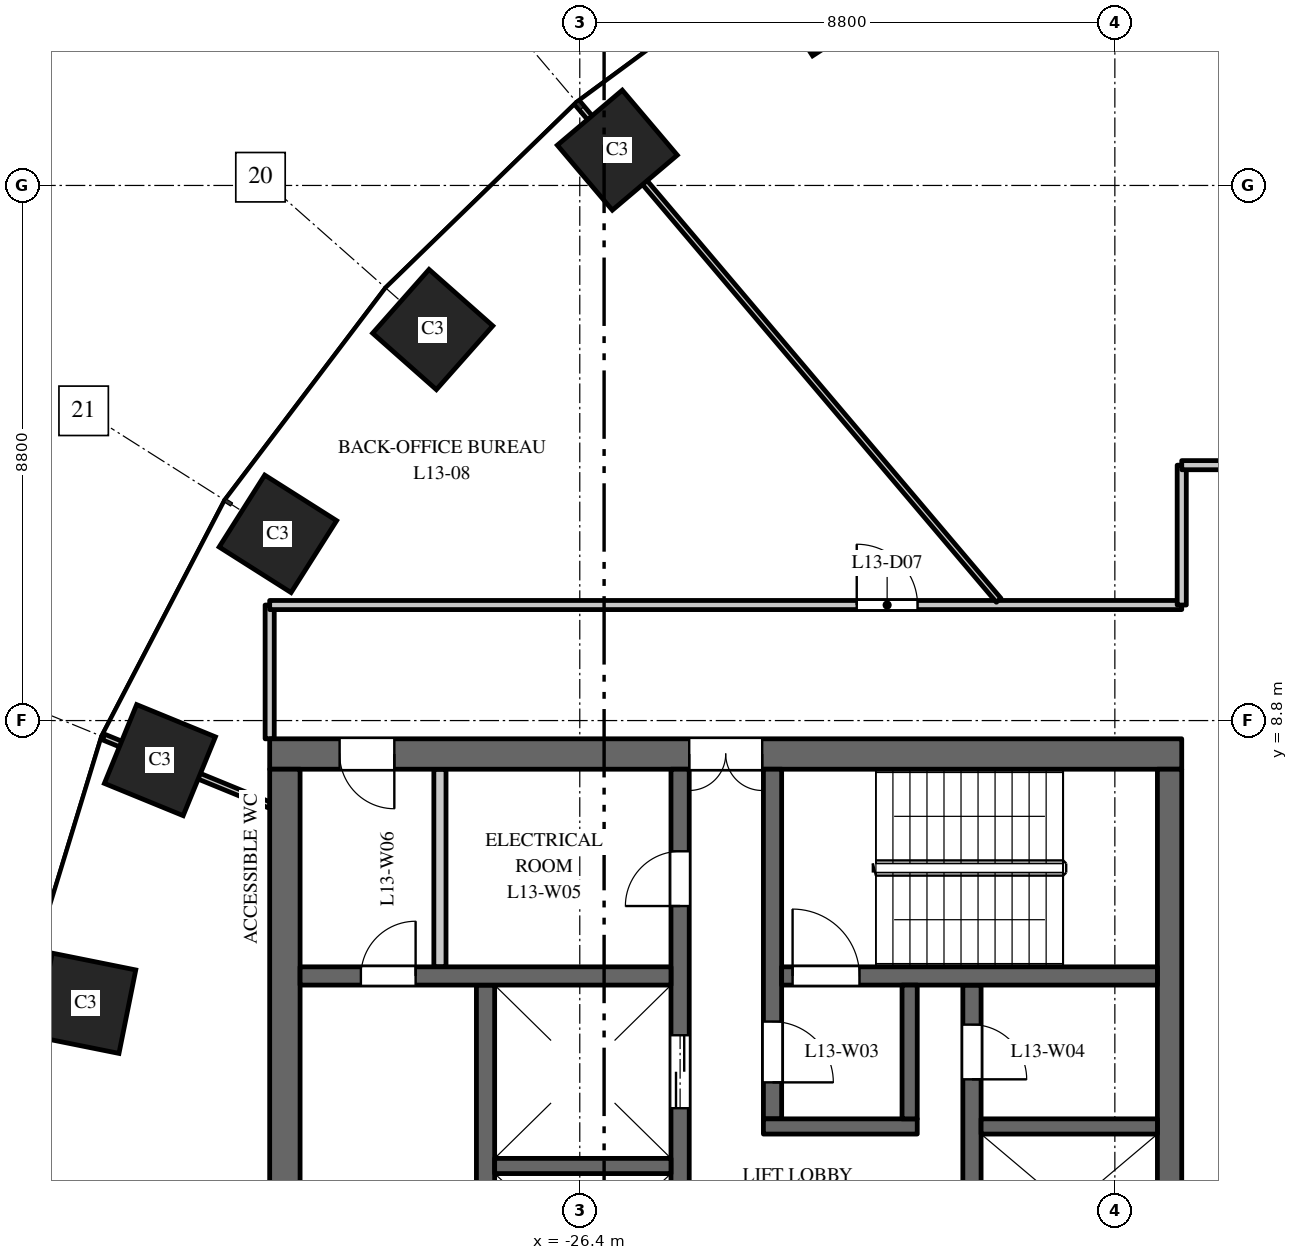
"""IFC4 building model, lengths in metres.
Left out: names, types, materials, properties, quantities, classifications, styles, units other than length and angle.
Written with IfcOpenShell. Run it as: python <this file> out.ifc"""

import sys

from ifc_helpers import new_model, si_unit, direction, frame, frame_2d, origin, origin_2d, place, context, subcontext, project, spatial, rectangle, extrude, element, fill, save


model = new_model("IFC4")
c1 = context("Model", 3, precision=1e-05, world=origin(), true_north=direction((0.0, 1.0)))
c2 = subcontext(c1, "Body", "Model", "MODEL_VIEW")
j1 = project(units=[si_unit("LENGTHUNIT", "METRE"), si_unit("PLANEANGLEUNIT", "RADIAN")], contexts=[c1])
p1 = place(None, origin())
s1 = spatial("IfcSite", under=j1, at=p1, CompositionType="ELEMENT")
p2 = place(p1, origin())
s2 = spatial("IfcBuilding", under=s1, at=p2, CompositionType="ELEMENT")
p3 = place(p2, frame((0.0, 0.0, 62.5)))
s3 = spatial("IfcBuildingStorey", under=s2, at=p3, CompositionType="ELEMENT", Elevation=62.5)
for number, where, z_axis, x_axis in (
    (1, (-22.362, 20.7, 0.0), (0.0, 0.0, 1.0), (-0.84, -0.542, 0.0)),
    (2, (-25.783, 18.18, 0.0), (0.0, 0.0, 1.0), (-0.763, -0.646, 0.0)),
    (3, (-28.819, 15.23, 0.0), (0.0, 0.0, 1.0), (-0.663, -0.749, 0.0)),
    (4, (-31.365, 11.871, 0.0), (0.0, 0.0, 1.0), (-0.535, -0.845, 0.0)),
    (5, (-33.305, 8.149, 0.0), (0.0, 0.0, 1.0), (-0.379, -0.925, 0.0)),
    (6, (-34.527, 4.151, 0.0), (0.0, 0.0, 1.0), (-0.197, -0.98, 0.0)),
):
    element("IfcColumn", number, at=place(p3, frame(where, z_axis=z_axis, x_axis=x_axis)), inside=s3, PredefinedType="COLUMN", context=c2, shape_type="SweptSolid", body=[
        extrude(rectangle(XDim=1.4, YDim=1.4, at=origin_2d()), origin(), (0.0, 0.0, 1.0), 4.0),
    ])
p4 = place(p3, frame((-16.5, 8.25, 0.0), z_axis=(0.0, 0.0, 1.0), x_axis=(-1.0, 0.0, 0.0)))
e7 = element("IfcWall", 7, at=p4, inside=s3, PredefinedType="SHEAR", context=c2, shape_type="SweptSolid", body=[
    extrude(rectangle(XDim=15.0, YDim=0.5, at=frame_2d((7.5, 0.0))), origin(), (0.0, 0.0, 1.0), 3.7),
])
p5 = place(p4, frame((6.9, 0.0, 0.0)))
e8 = element("IfcOpeningElement", 8, at=p5, cuts=e7, PredefinedType="OPENING", context=c2, shape_type="SweptSolid", body=[
    extrude(rectangle(XDim=1.2, YDim=2.1, at=frame_2d((0.6, 1.05))), frame((0.0, 0.26, 0.0), z_axis=(0.0, -1.0, 0.0), x_axis=(1.0, 0.0, 0.0)), (0.0, 0.0, 1.0), 0.52),
])
p6 = place(p4, frame((12.95, 0.0, 0.0)))
e9 = element("IfcOpeningElement", 9, at=p6, cuts=e7, PredefinedType="OPENING", context=c2, shape_type="SweptSolid", body=[
    extrude(rectangle(XDim=0.9, YDim=2.1, at=frame_2d((0.45, 1.05))), frame((0.0, 0.26, 0.0), z_axis=(0.0, -1.0, 0.0), x_axis=(1.0, 0.0, 0.0)), (0.0, 0.0, 1.0), 0.52),
])
p7 = place(p3, frame((-27.95, -4.45, 0.0), z_axis=(0.0, 0.0, 1.0), x_axis=(0.0, 1.0, 0.0)))
e10 = element("IfcWall", 10, at=p7, inside=s3, PredefinedType="SHEAR", context=c2, shape_type="SweptSolid", body=[
    extrude(rectangle(XDim=8.9, YDim=0.3, at=frame_2d((4.45, 0.0))), origin(), (0.0, 0.0, 1.0), 3.7),
])
p8 = place(p3, frame((-19.95, -4.45, 0.0), z_axis=(0.0, 0.0, 1.0), x_axis=(0.0, 1.0, 0.0)))
e11 = element("IfcWall", 11, at=p8, inside=s3, PredefinedType="SHEAR", context=c2, shape_type="SweptSolid", body=[
    extrude(rectangle(XDim=8.9, YDim=0.3, at=frame_2d((4.45, 0.0))), origin(), (0.0, 0.0, 1.0), 3.7),
])
p9 = place(p8, frame((0.775, 0.0, 0.0)))
e12 = element("IfcOpeningElement", 12, at=p9, cuts=e11, PredefinedType="OPENING", context=c2, shape_type="SweptSolid", body=[
    extrude(rectangle(XDim=1.2, YDim=2.1, at=frame_2d((0.6, 1.05))), frame((0.0, 0.16, 0.0), z_axis=(0.0, -1.0, 0.0), x_axis=(1.0, 0.0, 0.0)), (0.0, 0.0, 1.0), 0.32),
])
p10 = place(p8, frame((7.35, 0.0, 0.0)))
e13 = element("IfcOpeningElement", 13, at=p10, cuts=e11, PredefinedType="OPENING", context=c2, shape_type="SweptSolid", body=[
    extrude(rectangle(XDim=0.9, YDim=2.1, at=frame_2d((0.45, 1.05))), frame((0.0, 0.16, 0.0), z_axis=(0.0, -1.0, 0.0), x_axis=(1.0, 0.0, 0.0)), (0.0, 0.0, 1.0), 0.32),
])
p11 = place(p3, frame((-24.75, -8.0, 0.0), z_axis=(0.0, 0.0, 1.0), x_axis=(0.0, 1.0, 0.0)))
e14 = element("IfcWall", 14, at=p11, inside=s3, PredefinedType="SHEAR", context=c2, shape_type="SweptSolid", body=[
    extrude(rectangle(XDim=16.0, YDim=0.3, at=frame_2d((8.0, 0.0))), origin(), (0.0, 0.0, 1.0), 3.7),
])
p12 = place(p11, frame((4.425, 0.0, 0.0)))
e15 = element("IfcOpeningElement", 15, at=p12, cuts=e14, PredefinedType="OPENING", context=c2, shape_type="SweptSolid", body=[
    extrude(rectangle(XDim=1.1, YDim=2.1, at=frame_2d((0.55, 1.05))), frame((0.0, 0.16, 0.0), z_axis=(0.0, -1.0, 0.0), x_axis=(1.0, 0.0, 0.0)), (0.0, 0.0, 1.0), 0.32),
])
p13 = place(p11, frame((7.45, 0.0, 0.0)))
e16 = element("IfcOpeningElement", 16, at=p13, cuts=e14, PredefinedType="OPENING", context=c2, shape_type="SweptSolid", body=[
    extrude(rectangle(XDim=1.1, YDim=2.1, at=frame_2d((0.55, 1.05))), frame((0.0, 0.16, 0.0), z_axis=(0.0, -1.0, 0.0), x_axis=(1.0, 0.0, 0.0)), (0.0, 0.0, 1.0), 0.32),
])
p14 = place(p11, frame((10.425, 0.0, 0.0)))
e17 = element("IfcOpeningElement", 17, at=p14, cuts=e14, PredefinedType="OPENING", context=c2, shape_type="SweptSolid", body=[
    extrude(rectangle(XDim=1.2, YDim=2.1, at=frame_2d((0.6, 1.05))), frame((0.0, 0.16, 0.0), z_axis=(0.0, -1.0, 0.0), x_axis=(1.0, 0.0, 0.0)), (0.0, 0.0, 1.0), 0.32),
])
p15 = place(p11, frame((13.75, 0.0, 0.0)))
e18 = element("IfcOpeningElement", 18, at=p15, cuts=e14, PredefinedType="OPENING", context=c2, shape_type="SweptSolid", body=[
    extrude(rectangle(XDim=0.9, YDim=2.1, at=frame_2d((0.45, 1.05))), frame((0.0, 0.16, 0.0), z_axis=(0.0, -1.0, 0.0), x_axis=(1.0, 0.0, 0.0)), (0.0, 0.0, 1.0), 0.32),
])
p16 = place(p11, frame((1.35, 0.0, 0.0)))
e19 = element("IfcOpeningElement", 19, at=p16, cuts=e14, PredefinedType="OPENING", context=c2, shape_type="SweptSolid", body=[
    extrude(rectangle(XDim=0.9, YDim=2.1, at=frame_2d((0.45, 1.05))), frame((0.0, 0.16, 0.0), z_axis=(0.0, -1.0, 0.0), x_axis=(1.0, 0.0, 0.0)), (0.0, 0.0, 1.0), 0.32),
])
p17 = place(p3, frame((-16.7, -8.0, 0.0), z_axis=(0.0, 0.0, 1.0), x_axis=(0.0, 1.0, 0.0)))
e20 = element("IfcWall", 20, at=p17, inside=s3, PredefinedType="SHEAR", context=c2, shape_type="SweptSolid", body=[
    extrude(rectangle(XDim=16.0, YDim=0.4, at=frame_2d((8.0, 0.0))), origin(), (0.0, 0.0, 1.0), 3.7),
])
p18 = place(p3, frame((-31.25, -8.0, 0.0), z_axis=(0.0, 0.0, 1.0), x_axis=(0.0, 1.0, 0.0)))
e21 = element("IfcWall", 21, at=p18, inside=s3, PredefinedType="SHEAR", context=c2, shape_type="SweptSolid", body=[
    extrude(rectangle(XDim=16.0, YDim=0.5, at=frame_2d((8.0, 0.0))), origin(), (0.0, 0.0, 1.0), 3.7),
])
p19 = place(p3, frame((-24.9, 4.6, 0.0), z_axis=(0.0, 0.0, 1.0), x_axis=(-1.0, 0.0, 0.0)))
e22 = element("IfcWall", 22, at=p19, inside=s3, PredefinedType="SHEAR", context=c2, shape_type="SweptSolid", body=[
    extrude(rectangle(XDim=6.1, YDim=0.3, at=frame_2d((3.05, 0.0))), origin(), (0.0, 0.0, 1.0), 3.7),
])
p20 = place(p19, frame((4.2, 0.0, 0.0)))
e23 = element("IfcOpeningElement", 23, at=p20, cuts=e22, PredefinedType="OPENING", context=c2, shape_type="SweptSolid", body=[
    extrude(rectangle(XDim=0.9, YDim=2.1, at=frame_2d((0.45, 1.05))), frame((0.0, 0.16, 0.0), z_axis=(0.0, -1.0, 0.0), x_axis=(1.0, 0.0, 0.0)), (0.0, 0.0, 1.0), 0.32),
])
p21 = place(p3, frame((-28.7, 4.75, 0.0), z_axis=(0.0, 0.0, 1.0), x_axis=(0.0, 1.0, 0.0)))
e24 = element("IfcWall", 24, at=p21, inside=s3, PredefinedType="PARTITIONING", context=c2, shape_type="SweptSolid", body=[
    extrude(rectangle(XDim=3.25, YDim=0.2, at=frame_2d((1.625, 0.0))), origin(), (0.0, 0.0, 1.0), 3.7),
])
for number, where, z_axis, x_axis in (
    (25, (-16.9, 2.125, 0.0), (0.0, 0.0, 1.0), (-1.0, 0.0, 0.0)),
    (26, (-24.9, 1.475, 0.0), (0.0, 0.0, 1.0), (-1.0, 0.0, 0.0)),
):
    element("IfcWall", number, at=place(p3, frame(where, z_axis=z_axis, x_axis=x_axis)), inside=s3, PredefinedType="SHEAR", context=c2, shape_type="SweptSolid", body=[
        extrude(rectangle(XDim=2.9, YDim=0.25, at=frame_2d((1.45, 0.0))), origin(), (0.0, 0.0, 1.0), 3.7),
    ])
p22 = place(p3, frame((-23.23, 2.25, 0.0), z_axis=(0.0, 0.0, 1.0), x_axis=(0.0, 1.0, 0.0)))
e27 = element("IfcWall", 27, at=p22, inside=s3, PredefinedType="SHEAR", context=c2, shape_type="SweptSolid", body=[
    extrude(rectangle(XDim=5.75, YDim=0.3, at=frame_2d((2.875, 0.0))), origin(), (0.0, 0.0, 1.0), 3.7),
])
p23 = place(p22, frame((0.6, 0.0, 0.0)))
e28 = element("IfcOpeningElement", 28, at=p23, cuts=e27, PredefinedType="OPENING", context=c2, shape_type="SweptSolid", body=[
    extrude(rectangle(XDim=1.0, YDim=2.1, at=frame_2d((0.5, 1.05))), frame((0.0, 0.16, 0.0), z_axis=(0.0, -1.0, 0.0), x_axis=(1.0, 0.0, 0.0)), (0.0, 0.0, 1.0), 0.32),
])
p24 = place(p3, frame((-16.9, 4.6, 0.0), z_axis=(0.0, 0.0, 1.0), x_axis=(-1.0, 0.0, 0.0)))
e29 = element("IfcWall", 29, at=p24, inside=s3, PredefinedType="SHEAR", context=c2, shape_type="SweptSolid", body=[
    extrude(rectangle(XDim=6.18, YDim=0.3, at=frame_2d((3.09, 0.0))), origin(), (0.0, 0.0, 1.0), 3.7),
])
p25 = place(p24, frame((4.9, 0.0, 0.0)))
e30 = element("IfcOpeningElement", 30, at=p25, cuts=e29, PredefinedType="OPENING", context=c2, shape_type="SweptSolid", body=[
    extrude(rectangle(XDim=1.1, YDim=2.1, at=frame_2d((0.55, 1.05))), frame((0.0, 0.16, 0.0), z_axis=(0.0, -1.0, 0.0), x_axis=(1.0, 0.0, 0.0)), (0.0, 0.0, 1.0), 0.32),
])
p26 = place(p3, frame((-20.85, 2.125, 0.0), z_axis=(0.0, 0.0, 1.0), x_axis=(-1.0, 0.0, 0.0)))
e31 = element("IfcWall", 31, at=p26, inside=s3, PredefinedType="SHEAR", context=c2, shape_type="SweptSolid", body=[
    extrude(rectangle(XDim=2.53, YDim=0.25, at=frame_2d((1.265, 0.0))), origin(), (0.0, 0.0, 1.0), 3.7),
])
p27 = place(p3, frame((-20.975, 2.25, 0.0), z_axis=(0.0, 0.0, 1.0), x_axis=(0.0, 1.0, 0.0)))
e32 = element("IfcWall", 32, at=p27, inside=s3, PredefinedType="SHEAR", context=c2, shape_type="SweptSolid", body=[
    extrude(rectangle(XDim=2.2, YDim=0.25, at=frame_2d((1.1, 0.0))), origin(), (0.0, 0.0, 1.0), 3.7),
])
p28 = place(p3, frame((-34.234, 8.53, 0.0), z_axis=(0.0, 0.0, 1.0), x_axis=(0.925344112436, -0.379128307542, 0.0)))
e33 = element("IfcWall", 33, at=p28, inside=s3, PredefinedType="PARTITIONING", context=c2, shape_type="SweptSolid", body=[
    extrude(rectangle(XDim=2.954, YDim=0.1, at=frame_2d((1.477, 0.0))), origin(), (0.0, 0.0, 1.0), 2.85),
])
p29 = place(p3, frame((-31.5, 8.5, 0.0), z_axis=(0.0, 0.0, 1.0), x_axis=(0.0, 1.0, 0.0)))
e34 = element("IfcWall", 34, at=p29, inside=s3, PredefinedType="PARTITIONING", context=c2, shape_type="SweptSolid", body=[
    extrude(rectangle(XDim=2.2, YDim=0.15, at=frame_2d((1.1, 0.0))), origin(), (0.0, 0.0, 1.0), 3.7),
])
p30 = place(p3, frame((-31.5, 10.7, 0.0), z_axis=(0.0, 0.0, 1.0), x_axis=(1.0, 0.0, 0.0)))
e35 = element("IfcWall", 35, at=p30, inside=s3, PredefinedType="PARTITIONING", context=c2, shape_type="SweptSolid", body=[
    extrude(rectangle(XDim=15.0, YDim=0.15, at=frame_2d((7.5, 0.0))), origin(), (0.0, 0.0, 1.0), 3.1),
])
p31 = place(p30, frame((9.655, 0.0, 0.0)))
e36 = element("IfcOpeningElement", 36, at=p31, cuts=e35, PredefinedType="OPENING", context=c2, shape_type="SweptSolid", body=[
    extrude(rectangle(XDim=1.0, YDim=2.1, at=frame_2d((0.5, 1.05))), frame((0.0, 0.085, 0.0), z_axis=(0.0, -1.0, 0.0), x_axis=(1.0, 0.0, 0.0)), (0.0, 0.0, 1.0), 0.17),
])
p32 = place(p3, frame((-26.43, 18.945, 0.0), z_axis=(0.0, 0.0, 1.0), x_axis=(0.646400187952, -0.762998556365, 0.0)))
e37 = element("IfcWall", 37, at=p32, inside=s3, PredefinedType="PARTITIONING", context=c2, shape_type="SweptSolid", body=[
    extrude(rectangle(XDim=10.704, YDim=0.1, at=frame_2d((5.352, 0.0))), origin(), (0.0, 0.0, 1.0), 3.7),
])
p33 = place(p3, frame((-16.5, 10.7, 0.0), z_axis=(0.0, 0.0, 1.0), x_axis=(0.0, 1.0, 0.0)))
e38 = element("IfcWall", 38, at=p33, inside=s3, PredefinedType="PARTITIONING", context=c2, shape_type="SweptSolid", body=[
    extrude(rectangle(XDim=2.3, YDim=0.15, at=frame_2d((1.15, 0.0))), origin(), (0.0, 0.0, 1.0), 2.75),
])
p34 = place(p3, frame((-16.5, 13.0, 0.0), z_axis=(0.0, 0.0, 1.0), x_axis=(1.0, 0.0, 0.0)))
e39 = element("IfcWall", 39, at=p34, inside=s3, PredefinedType="PARTITIONING", context=c2, shape_type="SweptSolid", body=[
    extrude(rectangle(XDim=5.893, YDim=0.15, at=frame_2d((2.947, 0.0))), origin(), (0.0, 0.0, 1.0), 2.85),
])
p35 = place(p34, frame((4.255, 0.0, 0.0)))
e40 = element("IfcOpeningElement", 40, at=p35, cuts=e39, PredefinedType="OPENING", context=c2, shape_type="SweptSolid", body=[
    extrude(rectangle(XDim=1.0, YDim=2.1, at=frame_2d((0.5, 1.05))), frame((0.0, 0.085, 0.0), z_axis=(0.0, -1.0, 0.0), x_axis=(1.0, 0.0, 0.0)), (0.0, 0.0, 1.0), 0.17),
])
p36 = place(p14, origin())
e41 = element("IfcDoor", 41, at=p36, inside=s3, OperationType="DOUBLE_DOOR_SLIDING", PredefinedType="DOOR", context=c2, shape_type="SweptSolid", body=[
    extrude(rectangle(XDim=1.2, YDim=2.1, at=frame_2d((0.6, 1.05))), frame((0.0, 0.025, 0.0), z_axis=(0.0, -1.0, 0.0), x_axis=(1.0, 0.0, 0.0)), (0.0, 0.0, 1.0), 0.05),
])
fill(e17, e41)
p37 = place(p25, origin())
e42 = element("IfcDoor", 42, at=p37, inside=s3, OperationType="SINGLE_SWING_RIGHT", PredefinedType="DOOR", context=c2, shape_type="SweptSolid", body=[
    extrude(rectangle(XDim=1.1, YDim=2.1, at=frame_2d((0.55, 1.05))), frame((0.0, 0.025, 0.0), z_axis=(0.0, -1.0, 0.0), x_axis=(1.0, 0.0, 0.0)), (0.0, 0.0, 1.0), 0.05),
])
fill(e30, e42)
p38 = place(p23, origin())
e43 = element("IfcDoor", 43, at=p38, inside=s3, OperationType="SINGLE_SWING_LEFT", PredefinedType="DOOR", context=c2, shape_type="SweptSolid", body=[
    extrude(rectangle(XDim=1.0, YDim=2.1, at=frame_2d((0.5, 1.05))), frame((0.0, 0.025, 0.0), z_axis=(0.0, -1.0, 0.0), x_axis=(1.0, 0.0, 0.0)), (0.0, 0.0, 1.0), 0.05),
])
fill(e28, e43)
p39 = place(p5, origin())
e44 = element("IfcDoor", 44, at=p39, inside=s3, OperationType="DOUBLE_DOOR_DOUBLE_SWING", PredefinedType="DOOR", context=c2, shape_type="SweptSolid", body=[
    extrude(rectangle(XDim=1.2, YDim=2.1, at=frame_2d((0.6, 1.05))), frame((0.0, 0.025, 0.0), z_axis=(0.0, -1.0, 0.0), x_axis=(1.0, 0.0, 0.0)), (0.0, 0.0, 1.0), 0.05),
])
fill(e8, e44)
p40 = place(p10, origin())
e45 = element("IfcDoor", 45, at=p40, inside=s3, OperationType="SINGLE_SWING_LEFT", PredefinedType="DOOR", context=c2, shape_type="SweptSolid", body=[
    extrude(rectangle(XDim=0.9, YDim=2.1, at=frame_2d((0.45, 1.05))), frame((0.0, 0.025, 0.0), z_axis=(0.0, -1.0, 0.0), x_axis=(1.0, 0.0, 0.0)), (0.0, 0.0, 1.0), 0.05),
])
fill(e13, e45)
p41 = place(p15, origin())
e46 = element("IfcDoor", 46, at=p41, inside=s3, OperationType="SINGLE_SWING_RIGHT", PredefinedType="DOOR", context=c2, shape_type="SweptSolid", body=[
    extrude(rectangle(XDim=0.9, YDim=2.1, at=frame_2d((0.45, 1.05))), frame((0.0, 0.025, 0.0), z_axis=(0.0, -1.0, 0.0), x_axis=(1.0, 0.0, 0.0)), (0.0, 0.0, 1.0), 0.05),
])
fill(e18, e46)
p42 = place(p6, origin())
e47 = element("IfcDoor", 47, at=p42, inside=s3, OperationType="SINGLE_SWING_RIGHT", PredefinedType="DOOR", context=c2, shape_type="SweptSolid", body=[
    extrude(rectangle(XDim=0.9, YDim=2.1, at=frame_2d((0.45, 1.05))), frame((0.0, 0.025, 0.0), z_axis=(0.0, -1.0, 0.0), x_axis=(1.0, 0.0, 0.0)), (0.0, 0.0, 1.0), 0.05),
])
fill(e9, e47)
p43 = place(p20, origin())
e48 = element("IfcDoor", 48, at=p43, inside=s3, OperationType="SINGLE_SWING_LEFT", PredefinedType="DOOR", context=c2, shape_type="SweptSolid", body=[
    extrude(rectangle(XDim=0.9, YDim=2.1, at=frame_2d((0.45, 1.05))), frame((0.0, 0.025, 0.0), z_axis=(0.0, -1.0, 0.0), x_axis=(1.0, 0.0, 0.0)), (0.0, 0.0, 1.0), 0.05),
])
fill(e23, e48)
p44 = place(p31, origin())
e49 = element("IfcDoor", 49, at=p44, inside=s3, OperationType="SINGLE_SWING_LEFT", PredefinedType="DOOR", context=c2, shape_type="SweptSolid", body=[
    extrude(rectangle(XDim=1.0, YDim=2.1, at=frame_2d((0.5, 1.05))), frame((0.0, 0.025, 0.0), z_axis=(0.0, -1.0, 0.0), x_axis=(1.0, 0.0, 0.0)), (0.0, 0.0, 1.0), 0.05),
])
fill(e36, e49)
save(model, sys.argv[1])
